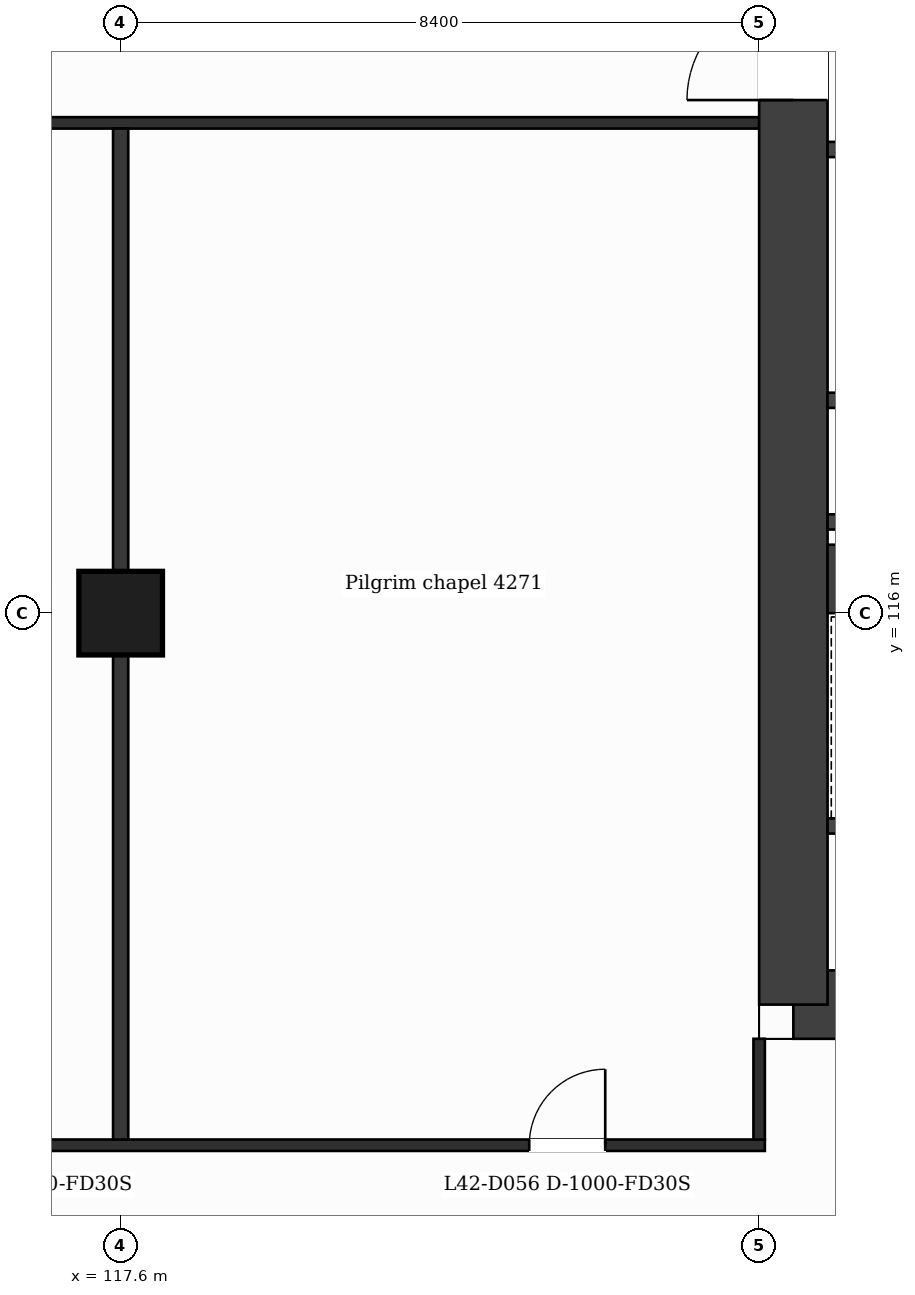
"""IFC4 building model, lengths in metres.
Left out: names, types, materials, properties, quantities, classifications, styles, units other than length and angle.
Written with IfcOpenShell. Run it as: python <this file> out.ifc"""

import sys

from ifc_helpers import new_model, si_unit, direction, frame, frame_2d, origin, origin_2d, place, context, subcontext, project, spatial, rectangle, extrude, element, fill, save


model = new_model("IFC4")
c1 = context("Model", 3, precision=1e-05, world=origin(), true_north=direction((0.0, 1.0)))
c2 = subcontext(c1, "Body", "Model", "MODEL_VIEW")
j1 = project(units=[si_unit("LENGTHUNIT", "METRE"), si_unit("PLANEANGLEUNIT", "RADIAN")], contexts=[c1])
p1 = place(None, origin())
s1 = spatial("IfcSite", under=j1, at=p1, CompositionType="ELEMENT")
p2 = place(p1, origin())
s2 = spatial("IfcBuilding", under=s1, at=p2, CompositionType="ELEMENT")
p3 = place(p2, frame((0.0, 0.0, 177.4)))
s3 = spatial("IfcBuildingStorey", under=s2, at=p3, CompositionType="ELEMENT", Elevation=177.4)
p4 = place(p3, frame((140.616, 110.85, 0.0), z_axis=(0.0, 0.0, 1.0), x_axis=(-1.0, 0.0, 0.0)))
e1 = element("IfcWall", 1, at=p4, inside=s3, PredefinedType="SHEAR", context=c2, shape_type="SweptSolid", body=[
    extrude(rectangle(XDim=14.166, YDim=0.9, at=frame_2d((7.083, 0.0))), origin(), (0.0, 0.0, 1.0), 3.7),
])
p5 = place(p4, frame((6.911, 0.0, 0.0)))
e2 = element("IfcOpeningElement", 2, at=p5, cuts=e1, PredefinedType="OPENING", context=c2, shape_type="SweptSolid", body=[
    extrude(rectangle(XDim=1.4, YDim=2.1, at=frame_2d((0.7, 1.05))), frame((0.0, 0.46, 0.0), z_axis=(0.0, -1.0, 0.0), x_axis=(1.0, 0.0, 0.0)), (0.0, 0.0, 1.0), 0.92),
])
p6 = place(p3, frame((126.45, 110.85, 0.0), z_axis=(0.0, 0.0, 1.0), x_axis=(0.0, 1.0, 0.0)))
e3 = element("IfcWall", 3, at=p6, inside=s3, PredefinedType="SHEAR", context=c2, shape_type="SweptSolid", body=[
    extrude(rectangle(XDim=21.1, YDim=0.9, at=frame_2d((10.55, 0.0))), origin(), (0.0, 0.0, 1.0), 3.7),
])
p7 = place(p6, frame((11.9, 0.0, 0.0)))
e4 = element("IfcOpeningElement", 4, at=p7, cuts=e3, PredefinedType="OPENING", context=c2, shape_type="SweptSolid", body=[
    extrude(rectangle(XDim=1.4, YDim=2.1, at=frame_2d((0.7, 1.05))), frame((0.0, 0.46, 0.0), z_axis=(0.0, -1.0, 0.0), x_axis=(1.0, 0.0, 0.0)), (0.0, 0.0, 1.0), 0.92),
])
p8 = place(p3, frame((126.9, 116.45, 0.0), z_axis=(0.0, 0.0, 1.0), x_axis=(1.0, 0.0, 0.0)))
e5 = element("IfcWall", 5, at=p8, inside=s3, PredefinedType="SHEAR", context=c2, shape_type="SweptSolid", body=[
    extrude(rectangle(XDim=5.1, YDim=0.9, at=frame_2d((2.55, 0.0))), origin(), (0.0, 0.0, 1.0), 3.7),
])
p9 = place(p3, frame((117.6, 116.0, 0.0), z_axis=(0.0, 0.0, 1.0), x_axis=(1.0, 0.0, 0.0)))
e6 = element("IfcColumn", 6, at=p9, inside=s3, PredefinedType="COLUMN", context=c2, shape_type="SweptSolid", body=[
    extrude(rectangle(XDim=1.1, YDim=1.1, at=origin_2d()), origin(), (0.0, 0.0, 1.0), 3.7),
])
p10 = place(p3, frame((100.725, 109.0, 0.0), z_axis=(0.0, 0.0, 1.0), x_axis=(1.0, 0.0, 0.0)))
e7 = element("IfcWall", 7, at=p10, inside=s3, PredefinedType="PARTITIONING", context=c2, shape_type="SweptSolid", body=[
    extrude(rectangle(XDim=25.35, YDim=0.15, at=frame_2d((12.675, 0.0))), origin(), (0.0, 0.0, 1.0), 3.38),
])
p11 = place(p10, frame((2.3, 0.0, 0.0)))
e8 = element("IfcOpeningElement", 8, at=p11, cuts=e7, PredefinedType="OPENING", context=c2, shape_type="SweptSolid", body=[
    extrude(rectangle(XDim=1.0, YDim=2.1, at=frame_2d((0.5, 1.05))), frame((0.0, 0.085, 0.0), z_axis=(0.0, -1.0, 0.0), x_axis=(1.0, 0.0, 0.0)), (0.0, 0.0, 1.0), 0.17),
])
p12 = place(p10, frame((6.5, 0.0, 0.0)))
e9 = element("IfcOpeningElement", 9, at=p12, cuts=e7, PredefinedType="OPENING", context=c2, shape_type="SweptSolid", body=[
    extrude(rectangle(XDim=1.0, YDim=2.1, at=frame_2d((0.5, 1.05))), frame((0.0, 0.085, 0.0), z_axis=(0.0, -1.0, 0.0), x_axis=(1.0, 0.0, 0.0)), (0.0, 0.0, 1.0), 0.17),
])
p13 = place(p10, frame((10.075, 0.0, 0.0)))
e10 = element("IfcOpeningElement", 10, at=p13, cuts=e7, PredefinedType="OPENING", context=c2, shape_type="SweptSolid", body=[
    extrude(rectangle(XDim=1.0, YDim=2.1, at=frame_2d((0.5, 1.05))), frame((0.0, 0.085, 0.0), z_axis=(0.0, -1.0, 0.0), x_axis=(1.0, 0.0, 0.0)), (0.0, 0.0, 1.0), 0.17),
])
p14 = place(p10, frame((14.9, 0.0, 0.0)))
e11 = element("IfcOpeningElement", 11, at=p14, cuts=e7, PredefinedType="OPENING", context=c2, shape_type="SweptSolid", body=[
    extrude(rectangle(XDim=1.0, YDim=2.1, at=frame_2d((0.5, 1.05))), frame((0.0, 0.085, 0.0), z_axis=(0.0, -1.0, 0.0), x_axis=(1.0, 0.0, 0.0)), (0.0, 0.0, 1.0), 0.17),
])
p15 = place(p10, frame((22.25, 0.0, 0.0)))
e12 = element("IfcOpeningElement", 12, at=p15, cuts=e7, PredefinedType="OPENING", context=c2, shape_type="SweptSolid", body=[
    extrude(rectangle(XDim=1.0, YDim=2.1, at=frame_2d((0.5, 1.05))), frame((0.0, 0.085, 0.0), z_axis=(0.0, -1.0, 0.0), x_axis=(1.0, 0.0, 0.0)), (0.0, 0.0, 1.0), 0.17),
])
p16 = place(p3, frame((126.9, 113.2, 0.0), z_axis=(0.0, 0.0, 1.0), x_axis=(1.0, 0.0, 0.0)))
e13 = element("IfcWall", 13, at=p16, inside=s3, PredefinedType="PARTITIONING", context=c2, shape_type="SweptSolid", body=[
    extrude(rectangle(XDim=4.773, YDim=0.2, at=frame_2d((2.387, 0.0))), origin(), (0.0, 0.0, 1.0), 3.38),
])
p17 = place(p16, frame((0.618, 0.0, 0.0)))
e14 = element("IfcOpeningElement", 14, at=p17, cuts=e13, PredefinedType="OPENING", context=c2, shape_type="SweptSolid", body=[
    extrude(rectangle(XDim=1.1, YDim=2.1, at=frame_2d((0.55, 1.05))), frame((0.0, 0.11, 0.0), z_axis=(0.0, -1.0, 0.0), x_axis=(1.0, 0.0, 0.0)), (0.0, 0.0, 1.0), 0.22),
])
for number, where, z_axis, x_axis in (
    (15, (126.9, 117.2, 0.0), (0.0, 0.0, 1.0), (1.0, 0.0, 0.0)),
    (16, (126.9, 118.8, 0.0), (0.0, 0.0, 1.0), (1.0, 0.0, 0.0)),
):
    element("IfcWall", number, at=place(p3, frame(where, z_axis=z_axis, x_axis=x_axis)), inside=s3, PredefinedType="PARTITIONING", context=c2, shape_type="SweptSolid", body=[
        extrude(rectangle(XDim=4.673, YDim=0.2, at=frame_2d((2.336, 0.0))), origin(), (0.0, 0.0, 1.0), 3.38),
    ])
p18 = place(p3, frame((126.9, 122.1, 0.0), z_axis=(0.0, 0.0, 1.0), x_axis=(1.0, 0.0, 0.0)))
e17 = element("IfcWall", 17, at=p18, inside=s3, PredefinedType="PARTITIONING", context=c2, shape_type="SweptSolid", body=[
    extrude(rectangle(XDim=4.673, YDim=0.2, at=frame_2d((2.336, 0.0))), origin(), (0.0, 0.0, 1.0), 3.38),
])
p19 = place(p18, frame((2.981, 0.0, 0.0)))
e18 = element("IfcOpeningElement", 18, at=p19, cuts=e17, PredefinedType="OPENING", context=c2, shape_type="SweptSolid", body=[
    extrude(rectangle(XDim=0.9, YDim=2.1, at=frame_2d((0.45, 1.05))), frame((0.0, 0.11, 0.0), z_axis=(0.0, -1.0, 0.0), x_axis=(1.0, 0.0, 0.0)), (0.0, 0.0, 1.0), 0.22),
])
p20 = place(p18, frame((0.645, 0.0, 0.0)))
e19 = element("IfcOpeningElement", 19, at=p20, cuts=e17, PredefinedType="OPENING", context=c2, shape_type="SweptSolid", body=[
    extrude(rectangle(XDim=0.9, YDim=2.1, at=frame_2d((0.45, 1.05))), frame((0.0, 0.11, 0.0), z_axis=(0.0, -1.0, 0.0), x_axis=(1.0, 0.0, 0.0)), (0.0, 0.0, 1.0), 0.22),
])
p21 = place(p3, frame((100.8, 122.45, 0.0), z_axis=(0.0, 0.0, 1.0), x_axis=(1.0, 0.0, 0.0)))
e20 = element("IfcWall", 20, at=p21, inside=s3, PredefinedType="PARTITIONING", context=c2, shape_type="SweptSolid", body=[
    extrude(rectangle(XDim=25.2, YDim=0.15, at=frame_2d((12.6, 0.0))), origin(), (0.0, 0.0, 1.0), 3.38),
])
p22 = place(p3, frame((117.6, 109.075, 0.0), z_axis=(0.0, 0.0, 1.0), x_axis=(0.0, 1.0, 0.0)))
e21 = element("IfcWall", 21, at=p22, inside=s3, PredefinedType="PARTITIONING", context=c2, shape_type="SweptSolid", body=[
    extrude(rectangle(XDim=13.3, YDim=0.2, at=frame_2d((6.65, 0.0))), origin(), (0.0, 0.0, 1.0), 3.38),
])
p23 = place(p3, frame((126.0, 109.075, 0.0), z_axis=(0.0, 0.0, 1.0), x_axis=(0.0, 1.0, 0.0)))
e22 = element("IfcWall", 22, at=p23, inside=s3, PredefinedType="PARTITIONING", context=c2, shape_type="SweptSolid", body=[
    extrude(rectangle(XDim=1.325, YDim=0.15, at=frame_2d((0.663, 0.0))), origin(), (0.0, 0.0, 1.0), 3.38),
])
p24 = place(p15, origin())
e23 = element("IfcDoor", 23, at=p24, inside=s3, OperationType="SINGLE_SWING_RIGHT", PredefinedType="DOOR", context=c2, shape_type="SweptSolid", body=[
    extrude(rectangle(XDim=1.0, YDim=2.1, at=frame_2d((0.5, 1.05))), frame((0.0, 0.025, 0.0), z_axis=(0.0, -1.0, 0.0), x_axis=(1.0, 0.0, 0.0)), (0.0, 0.0, 1.0), 0.05),
])
fill(e12, e23)
p25 = place(p7, origin())
e24 = element("IfcDoor", 24, at=p25, inside=s3, OperationType="SINGLE_SWING_LEFT", PredefinedType="DOOR", context=c2, shape_type="SweptSolid", body=[
    extrude(rectangle(XDim=1.4, YDim=2.1, at=frame_2d((0.7, 1.05))), frame((0.0, 0.025, 0.0), z_axis=(0.0, -1.0, 0.0), x_axis=(1.0, 0.0, 0.0)), (0.0, 0.0, 1.0), 0.05),
])
fill(e4, e24)
save(model, sys.argv[1])
